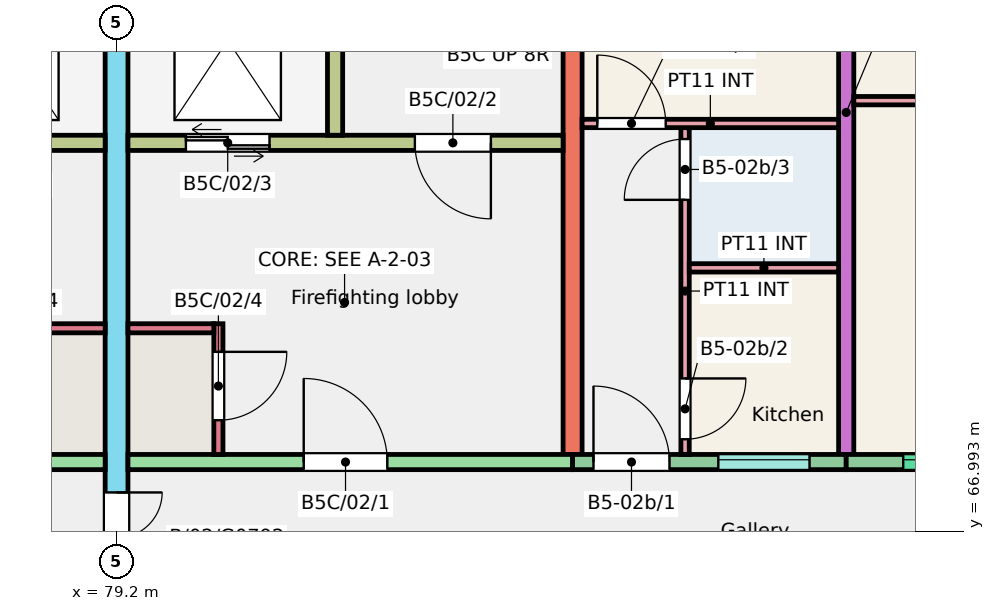
"""IFC4 building model, lengths in metres.
Left out: names, types, materials, properties, quantities, classifications, styles, units other than length and angle.
Written with IfcOpenShell. Run it as: python <this file> out.ifc"""

import sys

from ifc_helpers import new_model, si_unit, direction, frame, frame_2d, origin, place, context, subcontext, project, spatial, rectangle, extrude, element, fill, save


model = new_model("IFC4")
c1 = context("Model", 3, precision=1e-05, world=origin(), true_north=direction((0.0, 1.0)))
c2 = subcontext(c1, "Body", "Model", "MODEL_VIEW")
j1 = project(units=[si_unit("LENGTHUNIT", "METRE"), si_unit("PLANEANGLEUNIT", "RADIAN")], contexts=[c1])
p1 = place(None, origin())
s1 = spatial("IfcSite", under=j1, at=p1, CompositionType="ELEMENT")
p2 = place(p1, origin())
s2 = spatial("IfcBuilding", under=s1, at=p2, CompositionType="ELEMENT")
p3 = place(p2, frame((0.0, 0.0, 6.0)))
s3 = spatial("IfcBuildingStorey", under=s2, at=p3, CompositionType="ELEMENT", Elevation=6.0)
p4 = place(p3, frame((79.2, 66.0, 0.0), z_axis=(0.0, 0.0, 1.0), x_axis=(0.0, 1.0, 0.0)))
e1 = element("IfcWall", 1, at=p4, inside=s3, PredefinedType="SHEAR", context=c2, shape_type="SweptSolid", body=[
    extrude(rectangle(XDim=11.0, YDim=0.3, at=frame_2d((5.5, 0.0))), origin(), (0.0, 0.0, 1.0), 3.0),
])
p5 = place(p4, frame((0.3, 0.0, 0.0)))
e2 = element("IfcOpeningElement", 2, at=p5, cuts=e1, PredefinedType="OPENING", context=c2, shape_type="SweptSolid", body=[
    extrude(rectangle(XDim=1.2, YDim=2.1, at=frame_2d((0.6, 1.05))), frame((0.0, 0.16, 0.0), z_axis=(0.0, -1.0, 0.0), x_axis=(1.0, 0.0, 0.0)), (0.0, 0.0, 1.0), 0.32),
])
p6 = place(p3, frame((85.2, 68.0, 0.0), z_axis=(0.0, 0.0, 1.0), x_axis=(0.0, 1.0, 0.0)))
e3 = element("IfcWall", 3, at=p6, inside=s3, PredefinedType="SHEAR", context=c2, shape_type="SweptSolid", body=[
    extrude(rectangle(XDim=9.0, YDim=0.25, at=frame_2d((4.5, 0.0))), origin(), (0.0, 0.0, 1.0), 3.0),
])
p7 = place(p3, frame((88.8, 68.0, 0.0), z_axis=(0.0, 0.0, 1.0), x_axis=(0.0, 1.0, 0.0)))
e4 = element("IfcWall", 4, at=p7, inside=s3, PredefinedType="SHEAR", context=c2, shape_type="SweptSolid", body=[
    extrude(rectangle(XDim=9.0, YDim=0.2, at=frame_2d((4.5, 0.0))), origin(), (0.0, 0.0, 1.0), 3.0),
])
p8 = place(p3, frame((73.2, 67.9, 0.0), z_axis=(0.0, 0.0, 1.0), x_axis=(1.0, 0.0, 0.0)))
e5 = element("IfcWall", 5, at=p8, inside=s3, PredefinedType="SHEAR", context=c2, shape_type="SweptSolid", body=[
    extrude(rectangle(XDim=5.85, YDim=0.2, at=frame_2d((2.925, 0.0))), origin(), (0.0, 0.0, 1.0), 3.0),
])
p9 = place(p8, frame((2.438, 0.0, 0.0)))
e6 = element("IfcOpeningElement", 6, at=p9, cuts=e5, PredefinedType="OPENING", context=c2, shape_type="SweptSolid", body=[
    extrude(rectangle(XDim=1.1, YDim=2.1, at=frame_2d((0.55, 1.05))), frame((0.0, 0.11, 0.0), z_axis=(0.0, -1.0, 0.0), x_axis=(1.0, 0.0, 0.0)), (0.0, 0.0, 1.0), 0.22),
])
p10 = place(p3, frame((73.325, 72.1, 0.0), z_axis=(0.0, 0.0, 1.0), x_axis=(1.0, 0.0, 0.0)))
e7 = element("IfcWall", 7, at=p10, inside=s3, PredefinedType="SHEAR", context=c2, shape_type="SweptSolid", body=[
    extrude(rectangle(XDim=5.725, YDim=0.2, at=frame_2d((2.863, 0.0))), origin(), (0.0, 0.0, 1.0), 3.0),
])
p11 = place(p10, frame((0.95, 0.0, 0.0)))
e8 = element("IfcOpeningElement", 8, at=p11, cuts=e7, PredefinedType="OPENING", context=c2, shape_type="SweptSolid", body=[
    extrude(rectangle(XDim=1.0, YDim=2.1, at=frame_2d((0.5, 1.05))), frame((0.0, 0.11, 0.0), z_axis=(0.0, -1.0, 0.0), x_axis=(1.0, 0.0, 0.0)), (0.0, 0.0, 1.0), 0.22),
])
p12 = place(p10, frame((3.863, 0.0, 0.0)))
e9 = element("IfcOpeningElement", 9, at=p12, cuts=e7, PredefinedType="OPENING", context=c2, shape_type="SweptSolid", body=[
    extrude(rectangle(XDim=1.1, YDim=2.1, at=frame_2d((0.55, 1.05))), frame((0.0, 0.11, 0.0), z_axis=(0.0, -1.0, 0.0), x_axis=(1.0, 0.0, 0.0)), (0.0, 0.0, 1.0), 0.22),
])
p13 = place(p3, frame((77.92, 69.66, 0.0), z_axis=(0.0, 0.0, 1.0), x_axis=(1.0, 0.0, 0.0)))
e10 = element("IfcWall", 10, at=p13, inside=s3, PredefinedType="SHEAR", context=c2, shape_type="SweptSolid", body=[
    extrude(rectangle(XDim=1.13, YDim=0.12, at=frame_2d((0.565, 0.0))), origin(), (0.0, 0.0, 1.0), 3.0),
])
p14 = place(p3, frame((79.35, 67.9, 0.0), z_axis=(0.0, 0.0, 1.0), x_axis=(1.0, 0.0, 0.0)))
e11 = element("IfcWall", 11, at=p14, inside=s3, PredefinedType="SHEAR", context=c2, shape_type="SweptSolid", body=[
    extrude(rectangle(XDim=5.85, YDim=0.2, at=frame_2d((2.925, 0.0))), origin(), (0.0, 0.0, 1.0), 3.0),
])
p15 = place(p14, frame((2.312, 0.0, 0.0)))
e12 = element("IfcOpeningElement", 12, at=p15, cuts=e11, PredefinedType="OPENING", context=c2, shape_type="SweptSolid", body=[
    extrude(rectangle(XDim=1.1, YDim=2.1, at=frame_2d((0.55, 1.05))), frame((0.0, 0.11, 0.0), z_axis=(0.0, -1.0, 0.0), x_axis=(1.0, 0.0, 0.0)), (0.0, 0.0, 1.0), 0.22),
])
p16 = place(p3, frame((79.35, 72.1, 0.0), z_axis=(0.0, 0.0, 1.0), x_axis=(1.0, 0.0, 0.0)))
e13 = element("IfcWall", 13, at=p16, inside=s3, PredefinedType="SHEAR", context=c2, shape_type="SweptSolid", body=[
    extrude(rectangle(XDim=5.725, YDim=0.2, at=frame_2d((2.862, 0.0))), origin(), (0.0, 0.0, 1.0), 3.0),
])
p17 = place(p16, frame((3.775, 0.0, 0.0)))
e14 = element("IfcOpeningElement", 14, at=p17, cuts=e13, PredefinedType="OPENING", context=c2, shape_type="SweptSolid", body=[
    extrude(rectangle(XDim=1.0, YDim=2.1, at=frame_2d((0.5, 1.05))), frame((0.0, 0.11, 0.0), z_axis=(0.0, -1.0, 0.0), x_axis=(1.0, 0.0, 0.0)), (0.0, 0.0, 1.0), 0.22),
])
p18 = place(p16, frame((0.762, 0.0, 0.0)))
e15 = element("IfcOpeningElement", 15, at=p18, cuts=e13, PredefinedType="OPENING", context=c2, shape_type="SweptSolid", body=[
    extrude(rectangle(XDim=1.1, YDim=2.1, at=frame_2d((0.55, 1.05))), frame((0.0, 0.11, 0.0), z_axis=(0.0, -1.0, 0.0), x_axis=(1.0, 0.0, 0.0)), (0.0, 0.0, 1.0), 0.22),
])
p19 = place(p3, frame((82.075, 72.2, 0.0), z_axis=(0.0, 0.0, 1.0), x_axis=(0.0, 1.0, 0.0)))
e16 = element("IfcWall", 16, at=p19, inside=s3, PredefinedType="SHEAR", context=c2, shape_type="SweptSolid", body=[
    extrude(rectangle(XDim=4.8, YDim=0.2, at=frame_2d((2.4, 0.0))), origin(), (0.0, 0.0, 1.0), 3.0),
])
p20 = place(p3, frame((80.54, 68.0, 0.0), z_axis=(0.0, 0.0, 1.0), x_axis=(0.0, 1.0, 0.0)))
e17 = element("IfcWall", 17, at=p20, inside=s3, PredefinedType="SHEAR", context=c2, shape_type="SweptSolid", body=[
    extrude(rectangle(XDim=1.72, YDim=0.12, at=frame_2d((0.86, 0.0))), origin(), (0.0, 0.0, 1.0), 3.0),
])
p21 = place(p20, frame((0.45, 0.0, 0.0)))
e18 = element("IfcOpeningElement", 18, at=p21, cuts=e17, PredefinedType="OPENING", context=c2, shape_type="SweptSolid", body=[
    extrude(rectangle(XDim=0.9, YDim=2.1, at=frame_2d((0.45, 1.05))), frame((0.0, 0.07, 0.0), z_axis=(0.0, -1.0, 0.0), x_axis=(1.0, 0.0, 0.0)), (0.0, 0.0, 1.0), 0.14),
])
p22 = place(p3, frame((79.35, 69.66, 0.0), z_axis=(0.0, 0.0, 1.0), x_axis=(1.0, 0.0, 0.0)))
e19 = element("IfcWall", 19, at=p22, inside=s3, PredefinedType="SHEAR", context=c2, shape_type="SweptSolid", body=[
    extrude(rectangle(XDim=1.13, YDim=0.12, at=frame_2d((0.565, 0.0))), origin(), (0.0, 0.0, 1.0), 3.0),
])
p23 = place(p3, frame((85.2, 67.9, 0.0), z_axis=(0.0, 0.0, 1.0), x_axis=(1.0, 0.0, 0.0)))
e20 = element("IfcWall", 20, at=p23, inside=s3, PredefinedType="SOLIDWALL", context=c2, shape_type="SweptSolid", body=[
    extrude(rectangle(XDim=3.6, YDim=0.2, at=frame_2d((1.8, 0.0))), origin(), (0.0, 0.0, 1.0), 3.0),
])
p24 = place(p23, frame((1.917, 0.0, 1.1)))
e21 = element("IfcOpeningElement", 21, at=p24, cuts=e20, PredefinedType="OPENING", context=c2, shape_type="SweptSolid", body=[
    extrude(rectangle(XDim=1.2, YDim=1.3, at=frame_2d((0.6, 0.65))), frame((0.0, 0.11, 0.0), z_axis=(0.0, -1.0, 0.0), x_axis=(1.0, 0.0, 0.0)), (0.0, 0.0, 1.0), 0.22),
])
p25 = place(p23, frame((0.275, 0.0, 0.0)))
e22 = element("IfcOpeningElement", 22, at=p25, cuts=e20, PredefinedType="OPENING", context=c2, shape_type="SweptSolid", body=[
    extrude(rectangle(XDim=1.0, YDim=2.1, at=frame_2d((0.5, 1.05))), frame((0.0, 0.11, 0.0), z_axis=(0.0, -1.0, 0.0), x_axis=(1.0, 0.0, 0.0)), (0.0, 0.0, 1.0), 0.22),
])
p26 = place(p3, frame((88.8, 67.9, 0.0), z_axis=(0.0, 0.0, 1.0), x_axis=(1.0, 0.0, 0.0)))
e23 = element("IfcWall", 23, at=p26, inside=s3, PredefinedType="SOLIDWALL", context=c2, shape_type="SweptSolid", body=[
    extrude(rectangle(XDim=3.6, YDim=0.2, at=frame_2d((1.8, 0.0))), origin(), (0.0, 0.0, 1.0), 3.0),
])
p27 = place(p26, frame((0.75, 0.0, 1.2)))
e24 = element("IfcOpeningElement", 24, at=p27, cuts=e23, PredefinedType="OPENING", context=c2, shape_type="SweptSolid", body=[
    extrude(rectangle(XDim=2.1, YDim=1.2, at=frame_2d((1.05, 0.6))), frame((0.0, 0.11, 0.0), z_axis=(0.0, -1.0, 0.0), x_axis=(1.0, 0.0, 0.0)), (0.0, 0.0, 1.0), 0.22),
])
p28 = place(p3, frame((88.9, 72.655, 0.0), z_axis=(0.0, 0.0, 1.0), x_axis=(1.0, 0.0, 0.0)))
e25 = element("IfcWall", 25, at=p28, inside=s3, PredefinedType="PARTITIONING", context=c2, shape_type="SweptSolid", body=[
    extrude(rectangle(XDim=3.4, YDim=0.11, at=frame_2d((1.7, 0.0))), origin(), (0.0, 0.0, 1.0), 2.8),
])
p29 = place(p3, frame((86.68, 68.0, 0.0), z_axis=(0.0, 0.0, 1.0), x_axis=(0.0, 1.0, 0.0)))
e26 = element("IfcWall", 26, at=p29, inside=s3, PredefinedType="PARTITIONING", context=c2, shape_type="SweptSolid", body=[
    extrude(rectangle(XDim=4.3, YDim=0.11, at=frame_2d((2.15, 0.0))), origin(), (0.0, 0.0, 1.0), 2.8),
])
p30 = place(p29, frame((0.2, 0.0, 0.0)))
e27 = element("IfcOpeningElement", 27, at=p30, cuts=e26, PredefinedType="OPENING", context=c2, shape_type="SweptSolid", body=[
    extrude(rectangle(XDim=0.8, YDim=2.1, at=frame_2d((0.4, 1.05))), frame((0.0, 0.065, 0.0), z_axis=(0.0, -1.0, 0.0), x_axis=(1.0, 0.0, 0.0)), (0.0, 0.0, 1.0), 0.13),
])
p31 = place(p29, frame((3.35, 0.0, 0.0)))
e28 = element("IfcOpeningElement", 28, at=p31, cuts=e26, PredefinedType="OPENING", context=c2, shape_type="SweptSolid", body=[
    extrude(rectangle(XDim=0.8, YDim=2.1, at=frame_2d((0.4, 1.05))), frame((0.0, 0.065, 0.0), z_axis=(0.0, -1.0, 0.0), x_axis=(1.0, 0.0, 0.0)), (0.0, 0.0, 1.0), 0.13),
])
p32 = place(p3, frame((86.735, 70.455, 0.0), z_axis=(0.0, 0.0, 1.0), x_axis=(1.0, 0.0, 0.0)))
e29 = element("IfcWall", 29, at=p32, inside=s3, PredefinedType="PARTITIONING", context=c2, shape_type="SweptSolid", body=[
    extrude(rectangle(XDim=1.965, YDim=0.11, at=frame_2d((0.982, 0.0))), origin(), (0.0, 0.0, 1.0), 2.8),
])
p33 = place(p3, frame((85.325, 72.355, 0.0), z_axis=(0.0, 0.0, 1.0), x_axis=(1.0, 0.0, 0.0)))
e30 = element("IfcWall", 30, at=p33, inside=s3, PredefinedType="PARTITIONING", context=c2, shape_type="SweptSolid", body=[
    extrude(rectangle(XDim=3.375, YDim=0.11, at=frame_2d((1.688, 0.0))), origin(), (0.0, 0.0, 1.0), 2.8),
])
p34 = place(p33, frame((0.2, 0.0, 0.0)))
e31 = element("IfcOpeningElement", 31, at=p34, cuts=e30, PredefinedType="OPENING", context=c2, shape_type="SweptSolid", body=[
    extrude(rectangle(XDim=0.9, YDim=2.1, at=frame_2d((0.45, 1.05))), frame((0.0, 0.065, 0.0), z_axis=(0.0, -1.0, 0.0), x_axis=(1.0, 0.0, 0.0)), (0.0, 0.0, 1.0), 0.13),
])
p35 = place(p27, origin())
e32 = element("IfcWindow", 32, at=p35, inside=s3, PartitioningType="SINGLE_PANEL", PredefinedType="WINDOW", context=c2, shape_type="SweptSolid", body=[
    extrude(rectangle(XDim=2.1, YDim=1.2, at=frame_2d((1.05, 0.6))), frame((0.0, 0.06, 0.0), z_axis=(0.0, -1.0, 0.0), x_axis=(1.0, 0.0, 0.0)), (0.0, 0.0, 1.0), 0.06),
])
fill(e24, e32)
p36 = place(p24, origin())
e33 = element("IfcWindow", 33, at=p36, inside=s3, PartitioningType="SINGLE_PANEL", PredefinedType="WINDOW", context=c2, shape_type="SweptSolid", body=[
    extrude(rectangle(XDim=1.2, YDim=1.3, at=frame_2d((0.6, 0.65))), frame((0.0, 0.06, 0.0), z_axis=(0.0, -1.0, 0.0), x_axis=(1.0, 0.0, 0.0)), (0.0, 0.0, 1.0), 0.06),
])
fill(e21, e33)
p37 = place(p25, origin())
e34 = element("IfcDoor", 34, at=p37, inside=s3, OperationType="SINGLE_SWING_LEFT", PredefinedType="DOOR", context=c2, shape_type="SweptSolid", body=[
    extrude(rectangle(XDim=1.0, YDim=2.1, at=frame_2d((0.5, 1.05))), frame((0.0, 0.025, 0.0), z_axis=(0.0, -1.0, 0.0), x_axis=(1.0, 0.0, 0.0)), (0.0, 0.0, 1.0), 0.05),
])
fill(e22, e34)
p38 = place(p30, origin())
e35 = element("IfcDoor", 35, at=p38, inside=s3, OperationType="SINGLE_SWING_RIGHT", PredefinedType="DOOR", context=c2, shape_type="SweptSolid", body=[
    extrude(rectangle(XDim=0.8, YDim=2.1, at=frame_2d((0.4, 1.05))), frame((0.0, 0.025, 0.0), z_axis=(0.0, -1.0, 0.0), x_axis=(1.0, 0.0, 0.0)), (0.0, 0.0, 1.0), 0.05),
])
fill(e27, e35)
p39 = place(p31, origin())
e36 = element("IfcDoor", 36, at=p39, inside=s3, OperationType="SINGLE_SWING_LEFT", PredefinedType="DOOR", context=c2, shape_type="SweptSolid", body=[
    extrude(rectangle(XDim=0.8, YDim=2.1, at=frame_2d((0.4, 1.05))), frame((0.0, 0.025, 0.0), z_axis=(0.0, -1.0, 0.0), x_axis=(1.0, 0.0, 0.0)), (0.0, 0.0, 1.0), 0.05),
])
fill(e28, e36)
p40 = place(p34, origin())
e37 = element("IfcDoor", 37, at=p40, inside=s3, OperationType="SINGLE_SWING_LEFT", PredefinedType="DOOR", context=c2, shape_type="SweptSolid", body=[
    extrude(rectangle(XDim=0.9, YDim=2.1, at=frame_2d((0.45, 1.05))), frame((0.0, 0.025, 0.0), z_axis=(0.0, -1.0, 0.0), x_axis=(1.0, 0.0, 0.0)), (0.0, 0.0, 1.0), 0.05),
])
fill(e31, e37)
p41 = place(p15, origin())
e38 = element("IfcDoor", 38, at=p41, inside=s3, OperationType="SINGLE_SWING_LEFT", PredefinedType="DOOR", context=c2, shape_type="SweptSolid", body=[
    extrude(rectangle(XDim=1.1, YDim=2.1, at=frame_2d((0.55, 1.05))), frame((0.0, 0.025, 0.0), z_axis=(0.0, -1.0, 0.0), x_axis=(1.0, 0.0, 0.0)), (0.0, 0.0, 1.0), 0.05),
])
fill(e12, e38)
p42 = place(p17, origin())
e39 = element("IfcDoor", 39, at=p42, inside=s3, OperationType="SINGLE_SWING_RIGHT", PredefinedType="DOOR", context=c2, shape_type="SweptSolid", body=[
    extrude(rectangle(XDim=1.0, YDim=2.1, at=frame_2d((0.5, 1.05))), frame((0.0, 0.025, 0.0), z_axis=(0.0, -1.0, 0.0), x_axis=(1.0, 0.0, 0.0)), (0.0, 0.0, 1.0), 0.05),
])
fill(e14, e39)
p43 = place(p18, origin())
e40 = element("IfcDoor", 40, at=p43, inside=s3, OperationType="DOUBLE_DOOR_SLIDING", PredefinedType="DOOR", context=c2, shape_type="SweptSolid", body=[
    extrude(rectangle(XDim=1.1, YDim=2.1, at=frame_2d((0.55, 1.05))), frame((0.0, 0.025, 0.0), z_axis=(0.0, -1.0, 0.0), x_axis=(1.0, 0.0, 0.0)), (0.0, 0.0, 1.0), 0.05),
])
fill(e15, e40)
p44 = place(p21, origin())
e41 = element("IfcDoor", 41, at=p44, inside=s3, OperationType="SINGLE_SWING_RIGHT", PredefinedType="DOOR", context=c2, shape_type="SweptSolid", body=[
    extrude(rectangle(XDim=0.9, YDim=2.1, at=frame_2d((0.45, 1.05))), frame((0.0, 0.025, 0.0), z_axis=(0.0, -1.0, 0.0), x_axis=(1.0, 0.0, 0.0)), (0.0, 0.0, 1.0), 0.05),
])
fill(e18, e41)
p45 = place(p5, origin())
e42 = element("IfcDoor", 42, at=p45, inside=s3, OperationType="DOUBLE_DOOR_SINGLE_SWING", PredefinedType="DOOR", context=c2, shape_type="SweptSolid", body=[
    extrude(rectangle(XDim=1.2, YDim=2.1, at=frame_2d((0.6, 1.05))), frame((0.0, 0.025, 0.0), z_axis=(0.0, -1.0, 0.0), x_axis=(1.0, 0.0, 0.0)), (0.0, 0.0, 1.0), 0.05),
])
fill(e2, e42)
save(model, sys.argv[1])
